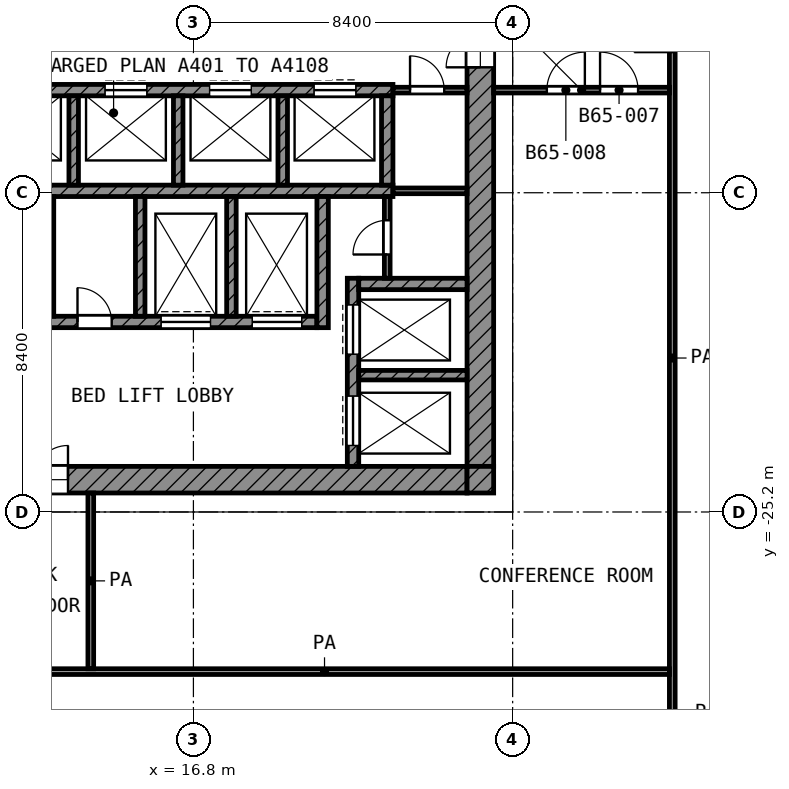
"""IFC4 building model, lengths in metres.
Left out: names, types, materials, properties, quantities, classifications, styles, units other than length and angle.
Written with IfcOpenShell. Run it as: python <this file> out.ifc"""

import sys

from ifc_helpers import new_model, si_unit, direction, frame, frame_2d, origin, place, context, subcontext, project, spatial, rectangle, extrude, element, fill, save


model = new_model("IFC4")
c1 = context("Model", 3, precision=1e-05, world=origin(), true_north=direction((0.0, 1.0)))
c2 = subcontext(c1, "Body", "Model", "MODEL_VIEW")
j1 = project(units=[si_unit("LENGTHUNIT", "METRE"), si_unit("PLANEANGLEUNIT", "RADIAN")], contexts=[c1])
p1 = place(None, origin())
s1 = spatial("IfcSite", under=j1, at=p1, CompositionType="ELEMENT")
p2 = place(p1, origin())
s2 = spatial("IfcBuilding", under=s1, at=p2, CompositionType="ELEMENT")
p3 = place(p2, frame((0.0, 0.0, 281.8)))
s3 = spatial("IfcBuildingStorey", under=s2, at=p3, CompositionType="ELEMENT", Elevation=281.8)
p4 = place(p3, frame((24.35, -24.0, 0.0), z_axis=(0.0, 0.0, 1.0), x_axis=(0.0, 1.0, 0.0)))
e1 = element("IfcWall", 1, at=p4, inside=s3, PredefinedType="SHEAR", context=c2, shape_type="SweptSolid", body=[
    extrude(rectangle(XDim=18.6, YDim=0.7, at=frame_2d((9.3, 0.0))), origin(), (0.0, 0.0, 1.0), 3.6),
])
p5 = place(p4, frame((10.5, 0.0, 0.0)))
e2 = element("IfcOpeningElement", 2, at=p5, cuts=e1, PredefinedType="OPENING", context=c2, shape_type="SweptSolid", body=[
    extrude(rectangle(XDim=1.8, YDim=2.1, at=frame_2d((0.9, 1.05))), frame((0.0, 0.36, 0.0), z_axis=(0.0, -1.0, 0.0), x_axis=(1.0, 0.0, 0.0)), (0.0, 0.0, 1.0), 0.72),
])
p6 = place(p3, frame((5.4, -24.35, 0.0), z_axis=(0.0, 0.0, 1.0), x_axis=(1.0, 0.0, 0.0)))
e3 = element("IfcWall", 3, at=p6, inside=s3, PredefinedType="SHEAR", context=c2, shape_type="SweptSolid", body=[
    extrude(rectangle(XDim=18.6, YDim=0.7, at=frame_2d((9.3, 0.0))), origin(), (0.0, 0.0, 1.0), 3.6),
])
p7 = place(p6, frame((6.3, 0.0, 0.0)))
e4 = element("IfcOpeningElement", 4, at=p7, cuts=e3, PredefinedType="OPENING", context=c2, shape_type="SweptSolid", body=[
    extrude(rectangle(XDim=1.8, YDim=2.1, at=frame_2d((0.9, 1.05))), frame((0.0, 0.36, 0.0), z_axis=(0.0, -1.0, 0.0), x_axis=(1.0, 0.0, 0.0)), (0.0, 0.0, 1.0), 0.72),
])
p8 = place(p3, frame((24.35, -24.7, 0.0), z_axis=(0.0, 0.0, 1.0), x_axis=(0.0, 1.0, 0.0)))
e5 = element("IfcWall", 5, at=p8, inside=s3, PredefinedType="SHEAR", context=c2, shape_type="SweptSolid", body=[
    extrude(rectangle(XDim=0.7, YDim=0.7, at=frame_2d((0.35, 0.0))), origin(), (0.0, 0.0, 1.0), 3.6),
])
p9 = place(p3, frame((5.4, -14.1, 0.0), z_axis=(0.0, 0.0, 1.0), x_axis=(1.0, 0.0, 0.0)))
e6 = element("IfcWall", 6, at=p9, inside=s3, PredefinedType="SHEAR", context=c2, shape_type="SweptSolid", body=[
    extrude(rectangle(XDim=16.65, YDim=0.3, at=frame_2d((8.325, 0.0))), origin(), (0.0, 0.0, 1.0), 3.6),
])
p10 = place(p9, frame((6.325, 0.0, 0.0)))
e7 = element("IfcOpeningElement", 7, at=p10, cuts=e6, PredefinedType="OPENING", context=c2, shape_type="SweptSolid", body=[
    extrude(rectangle(XDim=1.1, YDim=2.1, at=frame_2d((0.55, 1.05))), frame((0.0, 0.16, 0.0), z_axis=(0.0, -1.0, 0.0), x_axis=(1.0, 0.0, 0.0)), (0.0, 0.0, 1.0), 0.32),
])
p11 = place(p9, frame((9.075, 0.0, 0.0)))
e8 = element("IfcOpeningElement", 8, at=p11, cuts=e6, PredefinedType="OPENING", context=c2, shape_type="SweptSolid", body=[
    extrude(rectangle(XDim=1.1, YDim=2.1, at=frame_2d((0.55, 1.05))), frame((0.0, 0.16, 0.0), z_axis=(0.0, -1.0, 0.0), x_axis=(1.0, 0.0, 0.0)), (0.0, 0.0, 1.0), 0.32),
])
p12 = place(p9, frame((11.825, 0.0, 0.0)))
e9 = element("IfcOpeningElement", 9, at=p12, cuts=e6, PredefinedType="OPENING", context=c2, shape_type="SweptSolid", body=[
    extrude(rectangle(XDim=1.1, YDim=2.1, at=frame_2d((0.55, 1.05))), frame((0.0, 0.16, 0.0), z_axis=(0.0, -1.0, 0.0), x_axis=(1.0, 0.0, 0.0)), (0.0, 0.0, 1.0), 0.32),
])
p13 = place(p9, frame((14.575, 0.0, 0.0)))
e10 = element("IfcOpeningElement", 10, at=p13, cuts=e6, PredefinedType="OPENING", context=c2, shape_type="SweptSolid", body=[
    extrude(rectangle(XDim=1.1, YDim=2.1, at=frame_2d((0.55, 1.05))), frame((0.0, 0.16, 0.0), z_axis=(0.0, -1.0, 0.0), x_axis=(1.0, 0.0, 0.0)), (0.0, 0.0, 1.0), 0.32),
])
p14 = place(p3, frame((5.4, -16.75, 0.0), z_axis=(0.0, 0.0, 1.0), x_axis=(1.0, 0.0, 0.0)))
e11 = element("IfcWall", 11, at=p14, inside=s3, PredefinedType="SHEAR", context=c2, shape_type="SweptSolid", body=[
    extrude(rectangle(XDim=16.65, YDim=0.3, at=frame_2d((8.325, 0.0))), origin(), (0.0, 0.0, 1.0), 3.6),
])
p15 = place(p3, frame((5.4, -20.2, 0.0), z_axis=(0.0, 0.0, 1.0), x_axis=(1.0, 0.0, 0.0)))
e12 = element("IfcWall", 12, at=p15, inside=s3, PredefinedType="SHEAR", context=c2, shape_type="SweptSolid", body=[
    extrude(rectangle(XDim=14.65, YDim=0.3, at=frame_2d((7.325, 0.0))), origin(), (0.0, 0.0, 1.0), 3.6),
])
p16 = place(p15, frame((10.55, 0.0, 0.0)))
e13 = element("IfcOpeningElement", 13, at=p16, cuts=e12, PredefinedType="OPENING", context=c2, shape_type="SweptSolid", body=[
    extrude(rectangle(XDim=1.3, YDim=2.1, at=frame_2d((0.65, 1.05))), frame((0.0, 0.16, 0.0), z_axis=(0.0, -1.0, 0.0), x_axis=(1.0, 0.0, 0.0)), (0.0, 0.0, 1.0), 0.32),
])
p17 = place(p15, frame((12.95, 0.0, 0.0)))
e14 = element("IfcOpeningElement", 14, at=p17, cuts=e12, PredefinedType="OPENING", context=c2, shape_type="SweptSolid", body=[
    extrude(rectangle(XDim=1.3, YDim=2.1, at=frame_2d((0.65, 1.05))), frame((0.0, 0.16, 0.0), z_axis=(0.0, -1.0, 0.0), x_axis=(1.0, 0.0, 0.0)), (0.0, 0.0, 1.0), 0.32),
])
p18 = place(p15, frame((0.55, 0.0, 0.0)))
e15 = element("IfcOpeningElement", 15, at=p18, cuts=e12, PredefinedType="OPENING", context=c2, shape_type="SweptSolid", body=[
    extrude(rectangle(XDim=1.3, YDim=2.1, at=frame_2d((0.65, 1.05))), frame((0.0, 0.16, 0.0), z_axis=(0.0, -1.0, 0.0), x_axis=(1.0, 0.0, 0.0)), (0.0, 0.0, 1.0), 0.32),
])
p19 = place(p15, frame((2.95, 0.0, 0.0)))
e16 = element("IfcOpeningElement", 16, at=p19, cuts=e12, PredefinedType="OPENING", context=c2, shape_type="SweptSolid", body=[
    extrude(rectangle(XDim=1.3, YDim=2.1, at=frame_2d((0.65, 1.05))), frame((0.0, 0.16, 0.0), z_axis=(0.0, -1.0, 0.0), x_axis=(1.0, 0.0, 0.0)), (0.0, 0.0, 1.0), 0.32),
])
p20 = place(p15, frame((5.95, 0.0, 0.0)))
e17 = element("IfcOpeningElement", 17, at=p20, cuts=e12, PredefinedType="OPENING", context=c2, shape_type="SweptSolid", body=[
    extrude(rectangle(XDim=0.9, YDim=2.1, at=frame_2d((0.45, 1.05))), frame((0.0, 0.16, 0.0), z_axis=(0.0, -1.0, 0.0), x_axis=(1.0, 0.0, 0.0)), (0.0, 0.0, 1.0), 0.32),
])
p21 = place(p15, frame((8.35, 0.0, 0.0)))
e18 = element("IfcOpeningElement", 18, at=p21, cuts=e12, PredefinedType="OPENING", context=c2, shape_type="SweptSolid", body=[
    extrude(rectangle(XDim=0.9, YDim=2.1, at=frame_2d((0.45, 1.05))), frame((0.0, 0.16, 0.0), z_axis=(0.0, -1.0, 0.0), x_axis=(1.0, 0.0, 0.0)), (0.0, 0.0, 1.0), 0.32),
])
p22 = place(p3, frame((20.2, -20.35, 0.0), z_axis=(0.0, 0.0, 1.0), x_axis=(0.0, 1.0, 0.0)))
e19 = element("IfcWall", 19, at=p22, inside=s3, PredefinedType="SHEAR", context=c2, shape_type="SweptSolid", body=[
    extrude(rectangle(XDim=3.45, YDim=0.3, at=frame_2d((1.725, 0.0))), origin(), (0.0, 0.0, 1.0), 3.6),
])
p23 = place(p3, frame((21.9, -16.6, 0.0), z_axis=(0.0, 0.0, 1.0), x_axis=(0.0, 1.0, 0.0)))
e20 = element("IfcWall", 20, at=p23, inside=s3, PredefinedType="SHEAR", context=c2, shape_type="SweptSolid", body=[
    extrude(rectangle(XDim=2.35, YDim=0.3, at=frame_2d((1.175, 0.0))), origin(), (0.0, 0.0, 1.0), 3.6),
])
p24 = place(p3, frame((21.15, -19.2, 0.0), z_axis=(0.0, 0.0, 1.0), x_axis=(1.0, 0.0, 0.0)))
e21 = element("IfcWall", 21, at=p24, inside=s3, PredefinedType="SHEAR", context=c2, shape_type="SweptSolid", body=[
    extrude(rectangle(XDim=2.85, YDim=0.3, at=frame_2d((1.425, 0.0))), origin(), (0.0, 0.0, 1.0), 3.6),
])
p25 = place(p3, frame((21.0, -24.0, 0.0), z_axis=(0.0, 0.0, 1.0), x_axis=(0.0, 1.0, 0.0)))
e22 = element("IfcWall", 22, at=p25, inside=s3, PredefinedType="SHEAR", context=c2, shape_type="SweptSolid", body=[
    extrude(rectangle(XDim=4.95, YDim=0.3, at=frame_2d((2.475, 0.0))), origin(), (0.0, 0.0, 1.0), 3.6),
])
p26 = place(p25, frame((2.95, 0.0, 0.0)))
e23 = element("IfcOpeningElement", 23, at=p26, cuts=e22, PredefinedType="OPENING", context=c2, shape_type="SweptSolid", body=[
    extrude(rectangle(XDim=1.3, YDim=2.1, at=frame_2d((0.65, 1.05))), frame((0.0, 0.16, 0.0), z_axis=(0.0, -1.0, 0.0), x_axis=(1.0, 0.0, 0.0)), (0.0, 0.0, 1.0), 0.32),
])
p27 = place(p25, frame((0.55, 0.0, 0.0)))
e24 = element("IfcOpeningElement", 24, at=p27, cuts=e22, PredefinedType="OPENING", context=c2, shape_type="SweptSolid", body=[
    extrude(rectangle(XDim=1.3, YDim=2.1, at=frame_2d((0.65, 1.05))), frame((0.0, 0.16, 0.0), z_axis=(0.0, -1.0, 0.0), x_axis=(1.0, 0.0, 0.0)), (0.0, 0.0, 1.0), 0.32),
])
p28 = place(p3, frame((21.15, -21.6, 0.0), z_axis=(0.0, 0.0, 1.0), x_axis=(1.0, 0.0, 0.0)))
e25 = element("IfcWall", 25, at=p28, inside=s3, PredefinedType="SHEAR", context=c2, shape_type="SweptSolid", body=[
    extrude(rectangle(XDim=2.85, YDim=0.25, at=frame_2d((1.425, 0.0))), origin(), (0.0, 0.0, 1.0), 3.6),
])
for number, where, z_axis, x_axis in (
    (26, (13.0, -20.05, 0.0), (0.0, 0.0, 1.0), (0.0, 1.0, 0.0)),
    (27, (15.4, -20.05, 0.0), (0.0, 0.0, 1.0), (0.0, 1.0, 0.0)),
    (28, (17.8, -20.05, 0.0), (0.0, 0.0, 1.0), (0.0, 1.0, 0.0)),
):
    element("IfcWall", number, at=place(p3, frame(where, z_axis=z_axis, x_axis=x_axis)), inside=s3, PredefinedType="SHEAR", context=c2, shape_type="SweptSolid", body=[
        extrude(rectangle(XDim=3.15, YDim=0.25, at=frame_2d((1.575, 0.0))), origin(), (0.0, 0.0, 1.0), 3.6),
    ])
for number, where, z_axis, x_axis in (
    (29, (13.65, -16.6, 0.0), (0.0, 0.0, 1.0), (0.0, 1.0, 0.0)),
    (30, (16.4, -16.6, 0.0), (0.0, 0.0, 1.0), (0.0, 1.0, 0.0)),
    (31, (19.15, -16.6, 0.0), (0.0, 0.0, 1.0), (0.0, 1.0, 0.0)),
):
    element("IfcWall", number, at=place(p3, frame(where, z_axis=z_axis, x_axis=x_axis)), inside=s3, PredefinedType="SHEAR", context=c2, shape_type="SweptSolid", body=[
        extrude(rectangle(XDim=2.35, YDim=0.25, at=frame_2d((1.175, 0.0))), origin(), (0.0, 0.0, 1.0), 3.6),
    ])
p29 = place(p3, frame((21.9, -19.05, 0.0), z_axis=(0.0, 0.0, 1.0), x_axis=(0.0, 1.0, 0.0)))
e32 = element("IfcWall", 32, at=p29, inside=s3, PredefinedType="PARTITIONING", context=c2, shape_type="SweptSolid", body=[
    extrude(rectangle(XDim=2.15, YDim=0.15, at=frame_2d((1.075, 0.0))), origin(), (0.0, 0.0, 1.0), 3.6),
])
p30 = place(p29, frame((0.625, 0.0, 0.0)))
e33 = element("IfcOpeningElement", 33, at=p30, cuts=e32, PredefinedType="OPENING", context=c2, shape_type="SweptSolid", body=[
    extrude(rectangle(XDim=0.9, YDim=2.1, at=frame_2d((0.45, 1.05))), frame((0.0, 0.085, 0.0), z_axis=(0.0, -1.0, 0.0), x_axis=(1.0, 0.0, 0.0)), (0.0, 0.0, 1.0), 0.17),
])
p31 = place(p3, frame((22.05, -16.75, 0.0), z_axis=(0.0, 0.0, 1.0), x_axis=(1.0, 0.0, 0.0)))
e34 = element("IfcWall", 34, at=p31, inside=s3, PredefinedType="PARTITIONING", context=c2, shape_type="SweptSolid", body=[
    extrude(rectangle(XDim=1.95, YDim=0.15, at=frame_2d((0.975, 0.0))), origin(), (0.0, 0.0, 1.0), 3.6),
])
p32 = place(p3, frame((22.05, -14.1, 0.0), z_axis=(0.0, 0.0, 1.0), x_axis=(1.0, 0.0, 0.0)))
e35 = element("IfcWall", 35, at=p32, inside=s3, PredefinedType="PARTITIONING", context=c2, shape_type="SweptSolid", body=[
    extrude(rectangle(XDim=1.95, YDim=0.15, at=frame_2d((0.975, 0.0))), origin(), (0.0, 0.0, 1.0), 3.6),
])
p33 = place(p32, frame((0.45, 0.0, 0.0)))
e36 = element("IfcOpeningElement", 36, at=p33, cuts=e35, PredefinedType="OPENING", context=c2, shape_type="SweptSolid", body=[
    extrude(rectangle(XDim=0.9, YDim=2.1, at=frame_2d((0.45, 1.05))), frame((0.0, 0.085, 0.0), z_axis=(0.0, -1.0, 0.0), x_axis=(1.0, 0.0, 0.0)), (0.0, 0.0, 1.0), 0.17),
])
p34 = place(p3, frame((11.175, -29.4, 0.0), z_axis=(0.0, 0.0, 1.0), x_axis=(1.0, 0.0, 0.0)))
e37 = element("IfcWall", 37, at=p34, inside=s3, PredefinedType="PARTITIONING", context=c2, shape_type="SweptSolid", body=[
    extrude(rectangle(XDim=18.15, YDim=0.15, at=frame_2d((9.075, 0.0))), origin(), (0.0, 0.0, 1.0), 3.6),
])
p35 = place(p3, frame((24.7, -14.1, 0.0), z_axis=(0.0, 0.0, 1.0), x_axis=(1.0, 0.0, 0.0)))
e38 = element("IfcWall", 38, at=p35, inside=s3, PredefinedType="PARTITIONING", context=c2, shape_type="SweptSolid", body=[
    extrude(rectangle(XDim=4.625, YDim=0.15, at=frame_2d((2.312, 0.0))), origin(), (0.0, 0.0, 1.0), 3.6),
])
p36 = place(p35, frame((2.8, 0.0, 0.0)))
e39 = element("IfcOpeningElement", 39, at=p36, cuts=e38, PredefinedType="OPENING", context=c2, shape_type="SweptSolid", body=[
    extrude(rectangle(XDim=1.0, YDim=2.1, at=frame_2d((0.5, 1.05))), frame((0.0, 0.085, 0.0), z_axis=(0.0, -1.0, 0.0), x_axis=(1.0, 0.0, 0.0)), (0.0, 0.0, 1.0), 0.17),
])
p37 = place(p35, frame((1.4, 0.0, 0.0)))
e40 = element("IfcOpeningElement", 40, at=p37, cuts=e38, PredefinedType="OPENING", context=c2, shape_type="SweptSolid", body=[
    extrude(rectangle(XDim=1.0, YDim=2.1, at=frame_2d((0.5, 1.05))), frame((0.0, 0.085, 0.0), z_axis=(0.0, -1.0, 0.0), x_axis=(1.0, 0.0, 0.0)), (0.0, 0.0, 1.0), 0.17),
])
p38 = place(p3, frame((14.1, -29.325, 0.0), z_axis=(0.0, 0.0, 1.0), x_axis=(0.0, 1.0, 0.0)))
e41 = element("IfcWall", 41, at=p38, inside=s3, PredefinedType="PARTITIONING", context=c2, shape_type="SweptSolid", body=[
    extrude(rectangle(XDim=4.625, YDim=0.15, at=frame_2d((2.312, 0.0))), origin(), (0.0, 0.0, 1.0), 3.6),
])
p39 = place(p3, frame((29.4, -31.198, 0.0), z_axis=(0.0, 0.0, 1.0), x_axis=(0.0, 1.0, 0.0)))
e42 = element("IfcWall", 42, at=p39, inside=s3, PredefinedType="PARTITIONING", context=c2, shape_type="SweptSolid", body=[
    extrude(rectangle(XDim=20.098, YDim=0.15, at=frame_2d((10.049, 0.0))), origin(), (0.0, 0.0, 1.0), 3.6),
])
p40 = place(p39, frame((18.098, 0.0, 0.0)))
e43 = element("IfcOpeningElement", 43, at=p40, cuts=e42, PredefinedType="OPENING", context=c2, shape_type="SweptSolid", body=[
    extrude(rectangle(XDim=1.0, YDim=2.1, at=frame_2d((0.5, 1.05))), frame((0.0, 0.085, 0.0), z_axis=(0.0, -1.0, 0.0), x_axis=(1.0, 0.0, 0.0)), (0.0, 0.0, 1.0), 0.17),
])
p41 = place(p11, origin())
e44 = element("IfcDoor", 44, at=p41, inside=s3, OperationType="DOUBLE_DOOR_SLIDING", PredefinedType="DOOR", context=c2, shape_type="SweptSolid", body=[
    extrude(rectangle(XDim=1.1, YDim=2.1, at=frame_2d((0.55, 1.05))), frame((0.0, 0.025, 0.0), z_axis=(0.0, -1.0, 0.0), x_axis=(1.0, 0.0, 0.0)), (0.0, 0.0, 1.0), 0.05),
])
fill(e8, e44)
p42 = place(p12, origin())
e45 = element("IfcDoor", 45, at=p42, inside=s3, OperationType="DOUBLE_DOOR_SLIDING", PredefinedType="DOOR", context=c2, shape_type="SweptSolid", body=[
    extrude(rectangle(XDim=1.1, YDim=2.1, at=frame_2d((0.55, 1.05))), frame((0.0, 0.025, 0.0), z_axis=(0.0, -1.0, 0.0), x_axis=(1.0, 0.0, 0.0)), (0.0, 0.0, 1.0), 0.05),
])
fill(e9, e45)
p43 = place(p13, origin())
e46 = element("IfcDoor", 46, at=p43, inside=s3, OperationType="DOUBLE_DOOR_SLIDING", PredefinedType="DOOR", context=c2, shape_type="SweptSolid", body=[
    extrude(rectangle(XDim=1.1, YDim=2.1, at=frame_2d((0.55, 1.05))), frame((0.0, 0.025, 0.0), z_axis=(0.0, -1.0, 0.0), x_axis=(1.0, 0.0, 0.0)), (0.0, 0.0, 1.0), 0.05),
])
fill(e10, e46)
p44 = place(p26, origin())
e47 = element("IfcDoor", 47, at=p44, inside=s3, OperationType="DOUBLE_DOOR_SLIDING", PredefinedType="DOOR", context=c2, shape_type="SweptSolid", body=[
    extrude(rectangle(XDim=1.3, YDim=2.1, at=frame_2d((0.65, 1.05))), frame((0.0, 0.025, 0.0), z_axis=(0.0, -1.0, 0.0), x_axis=(1.0, 0.0, 0.0)), (0.0, 0.0, 1.0), 0.05),
])
fill(e23, e47)
p45 = place(p27, origin())
e48 = element("IfcDoor", 48, at=p45, inside=s3, OperationType="DOUBLE_DOOR_SLIDING", PredefinedType="DOOR", context=c2, shape_type="SweptSolid", body=[
    extrude(rectangle(XDim=1.3, YDim=2.1, at=frame_2d((0.65, 1.05))), frame((0.0, 0.025, 0.0), z_axis=(0.0, -1.0, 0.0), x_axis=(1.0, 0.0, 0.0)), (0.0, 0.0, 1.0), 0.05),
])
fill(e24, e48)
p46 = place(p16, origin())
e49 = element("IfcDoor", 49, at=p46, inside=s3, OperationType="DOUBLE_DOOR_SLIDING", PredefinedType="DOOR", context=c2, shape_type="SweptSolid", body=[
    extrude(rectangle(XDim=1.3, YDim=2.1, at=frame_2d((0.65, 1.05))), frame((0.0, 0.025, 0.0), z_axis=(0.0, -1.0, 0.0), x_axis=(1.0, 0.0, 0.0)), (0.0, 0.0, 1.0), 0.05),
])
fill(e13, e49)
p47 = place(p17, origin())
e50 = element("IfcDoor", 50, at=p47, inside=s3, OperationType="DOUBLE_DOOR_SLIDING", PredefinedType="DOOR", context=c2, shape_type="SweptSolid", body=[
    extrude(rectangle(XDim=1.3, YDim=2.1, at=frame_2d((0.65, 1.05))), frame((0.0, 0.025, 0.0), z_axis=(0.0, -1.0, 0.0), x_axis=(1.0, 0.0, 0.0)), (0.0, 0.0, 1.0), 0.05),
])
fill(e14, e50)
p48 = place(p5, origin())
e51 = element("IfcDoor", 51, at=p48, inside=s3, OperationType="DOUBLE_DOOR_SINGLE_SWING", PredefinedType="DOOR", context=c2, shape_type="SweptSolid", body=[
    extrude(rectangle(XDim=1.8, YDim=2.1, at=frame_2d((0.9, 1.05))), frame((0.0, 0.025, 0.0), z_axis=(0.0, -1.0, 0.0), x_axis=(1.0, 0.0, 0.0)), (0.0, 0.0, 1.0), 0.05),
])
fill(e2, e51)
p49 = place(p7, origin())
e52 = element("IfcDoor", 52, at=p49, inside=s3, OperationType="DOUBLE_DOOR_SINGLE_SWING", PredefinedType="DOOR", context=c2, shape_type="SweptSolid", body=[
    extrude(rectangle(XDim=1.8, YDim=2.1, at=frame_2d((0.9, 1.05))), frame((0.0, 0.025, 0.0), z_axis=(0.0, -1.0, 0.0), x_axis=(1.0, 0.0, 0.0)), (0.0, 0.0, 1.0), 0.05),
])
fill(e4, e52)
p50 = place(p33, origin())
e53 = element("IfcDoor", 53, at=p50, inside=s3, OperationType="SINGLE_SWING_LEFT", PredefinedType="DOOR", context=c2, shape_type="SweptSolid", body=[
    extrude(rectangle(XDim=0.9, YDim=2.1, at=frame_2d((0.45, 1.05))), frame((0.0, 0.025, 0.0), z_axis=(0.0, -1.0, 0.0), x_axis=(1.0, 0.0, 0.0)), (0.0, 0.0, 1.0), 0.05),
])
fill(e36, e53)
p51 = place(p30, origin())
e54 = element("IfcDoor", 54, at=p51, inside=s3, OperationType="SINGLE_SWING_LEFT", PredefinedType="DOOR", context=c2, shape_type="SweptSolid", body=[
    extrude(rectangle(XDim=0.9, YDim=2.1, at=frame_2d((0.45, 1.05))), frame((0.0, 0.025, 0.0), z_axis=(0.0, -1.0, 0.0), x_axis=(1.0, 0.0, 0.0)), (0.0, 0.0, 1.0), 0.05),
])
fill(e33, e54)
p52 = place(p21, origin())
e55 = element("IfcDoor", 55, at=p52, inside=s3, OperationType="SINGLE_SWING_LEFT", PredefinedType="DOOR", context=c2, shape_type="SweptSolid", body=[
    extrude(rectangle(XDim=0.9, YDim=2.1, at=frame_2d((0.45, 1.05))), frame((0.0, 0.025, 0.0), z_axis=(0.0, -1.0, 0.0), x_axis=(1.0, 0.0, 0.0)), (0.0, 0.0, 1.0), 0.05),
])
fill(e18, e55)
p53 = place(p36, origin())
e56 = element("IfcDoor", 56, at=p53, inside=s3, OperationType="SINGLE_SWING_LEFT", PredefinedType="DOOR", context=c2, shape_type="SweptSolid", body=[
    extrude(rectangle(XDim=1.0, YDim=2.1, at=frame_2d((0.5, 1.05))), frame((0.0, 0.025, 0.0), z_axis=(0.0, -1.0, 0.0), x_axis=(1.0, 0.0, 0.0)), (0.0, 0.0, 1.0), 0.05),
])
fill(e39, e56)
p54 = place(p37, origin())
e57 = element("IfcDoor", 57, at=p54, inside=s3, OperationType="SINGLE_SWING_RIGHT", PredefinedType="DOOR", context=c2, shape_type="SweptSolid", body=[
    extrude(rectangle(XDim=1.0, YDim=2.1, at=frame_2d((0.5, 1.05))), frame((0.0, 0.025, 0.0), z_axis=(0.0, -1.0, 0.0), x_axis=(1.0, 0.0, 0.0)), (0.0, 0.0, 1.0), 0.05),
])
fill(e40, e57)
save(model, sys.argv[1])
